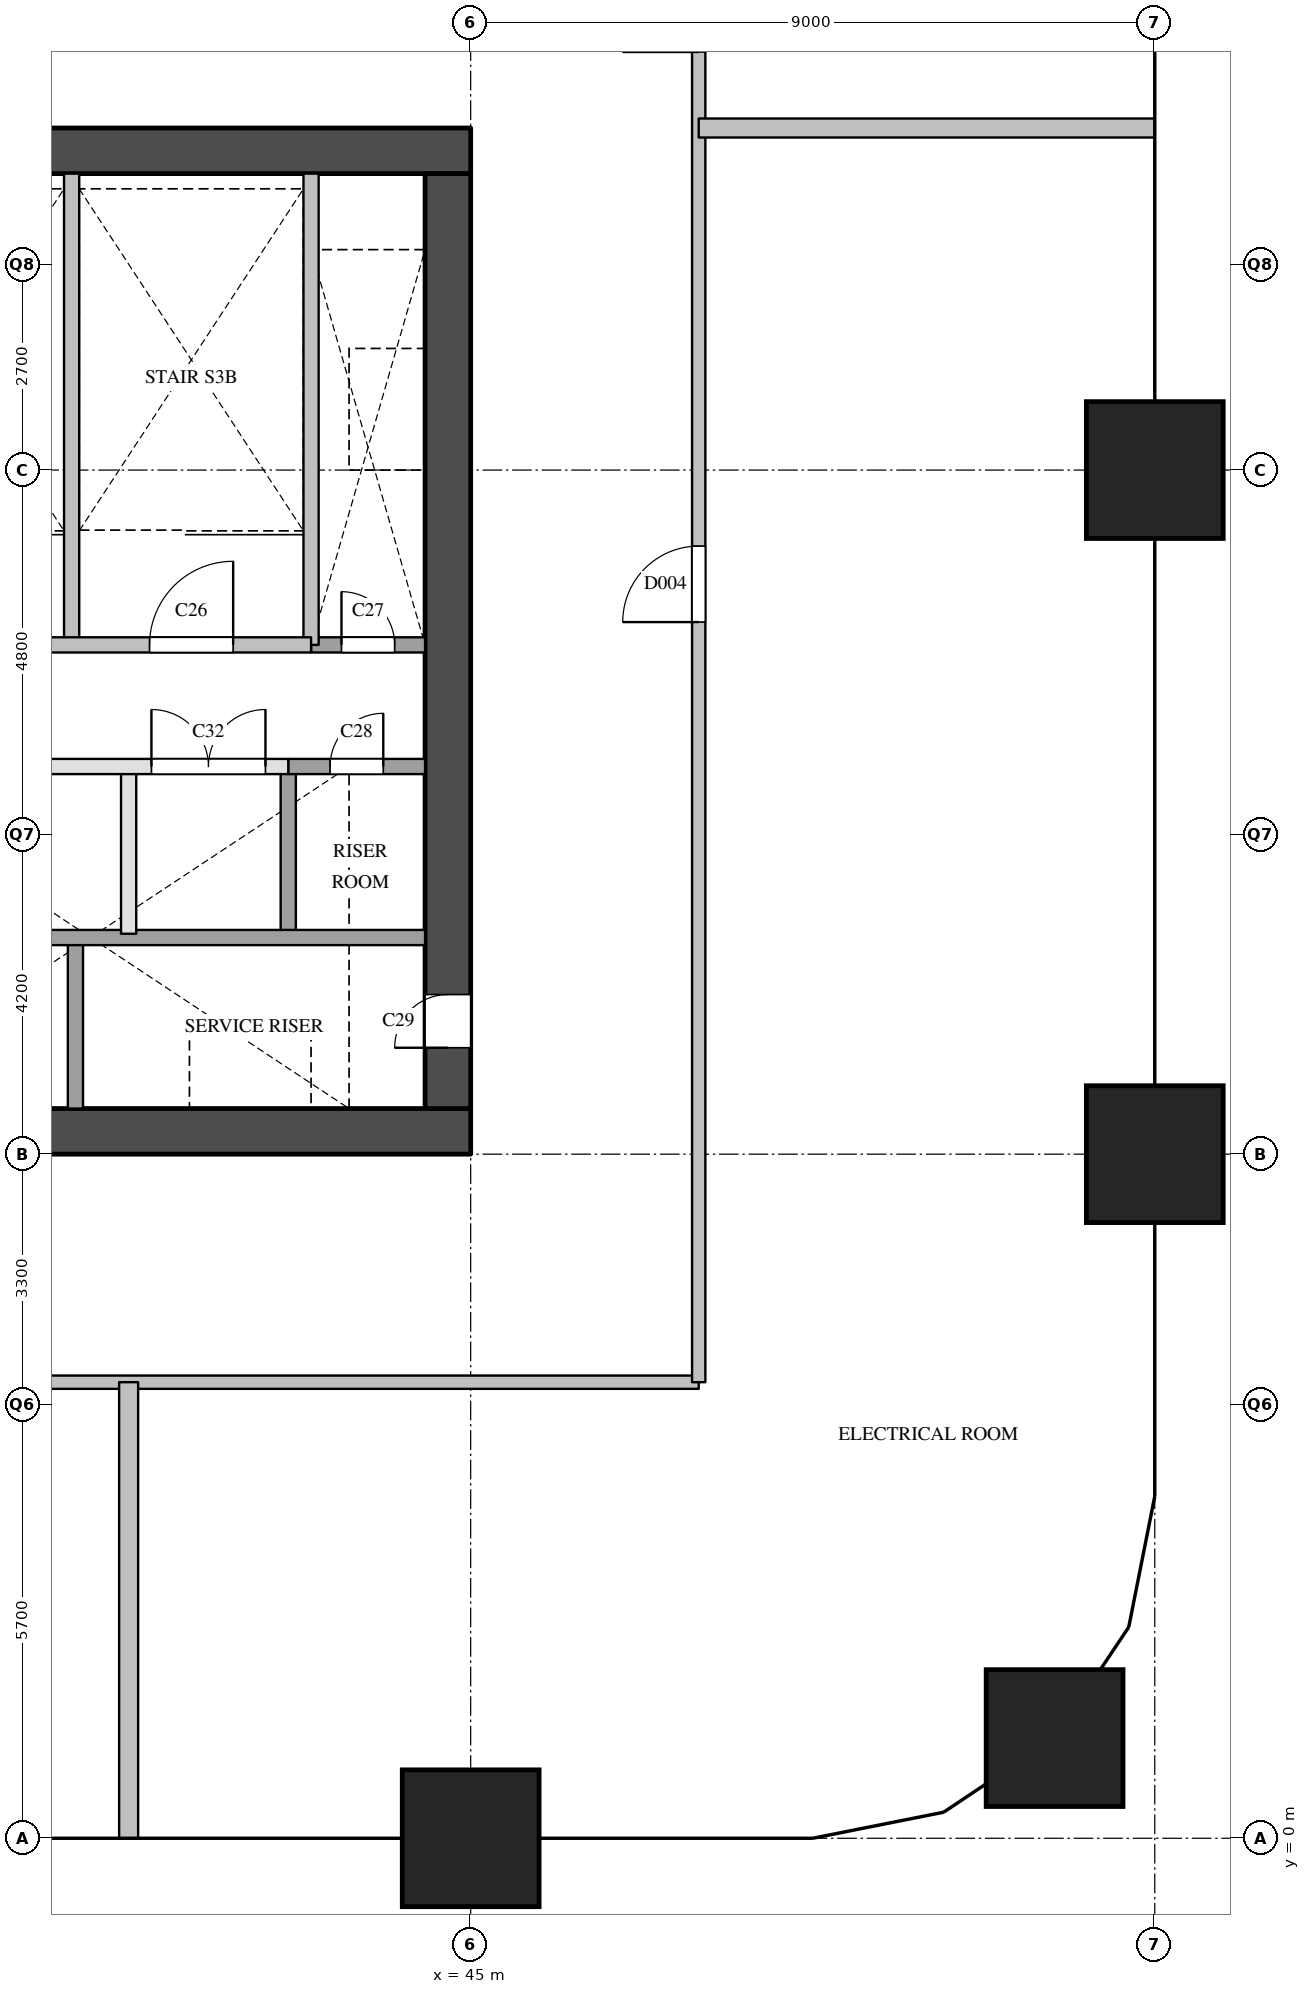
"""IFC4 building model, lengths in metres.
Left out: names, types, materials, properties, quantities, classifications, styles, units other than length and angle.
Written with IfcOpenShell. Run it as: python <this file> out.ifc"""

import sys

from ifc_helpers import new_model, si_unit, direction, frame, frame_2d, origin, origin_2d, place, context, subcontext, project, spatial, rectangle, extrude, element, fill, save


model = new_model("IFC4")
c1 = context("Model", 3, precision=1e-05, world=origin(), true_north=direction((0.0, 1.0)))
c2 = subcontext(c1, "Body", "Model", "MODEL_VIEW")
j1 = project(units=[si_unit("LENGTHUNIT", "METRE"), si_unit("PLANEANGLEUNIT", "RADIAN")], contexts=[c1])
p1 = place(None, origin())
s1 = spatial("IfcSite", under=j1, at=p1, CompositionType="ELEMENT")
p2 = place(p1, origin())
s2 = spatial("IfcBuilding", under=s1, at=p2, CompositionType="ELEMENT")
p3 = place(p2, frame((0.0, 0.0, 123.4)))
s3 = spatial("IfcBuildingStorey", under=s2, at=p3, CompositionType="ELEMENT", Elevation=123.4)
for number, where, z_axis, x_axis in (
    (1, (45.0, 0.0, 0.0), (0.0, 0.0, 1.0), (1.0, 0.0, 0.0)),
    (2, (52.682, 1.318, 0.0), (0.0, 0.0, 1.0), (1.0, 0.0, 0.0)),
    (3, (54.0, 9.0, 0.0), (0.0, 0.0, 1.0), (1.0, 0.0, 0.0)),
    (4, (54.0, 18.0, 0.0), (0.0, 0.0, 1.0), (1.0, 0.0, 0.0)),
):
    element("IfcColumn", number, at=place(p3, frame(where, z_axis=z_axis, x_axis=x_axis)), inside=s3, PredefinedType="COLUMN", context=c2, shape_type="SweptSolid", body=[
        extrude(rectangle(XDim=1.8, YDim=1.8, at=origin_2d()), origin(), (0.0, 0.0, 1.0), 6.0),
    ])
for number, where, z_axis, x_axis in (
    (5, (36.0, 9.3, 0.0), (0.0, 0.0, 1.0), (1.0, 0.0, 0.0)),
    (6, (36.0, 22.2, 0.0), (0.0, 0.0, 1.0), (1.0, 0.0, 0.0)),
):
    element("IfcWall", number, at=place(p3, frame(where, z_axis=z_axis, x_axis=x_axis)), inside=s3, PredefinedType="SHEAR", context=c2, shape_type="SweptSolid", body=[
        extrude(rectangle(XDim=9.0, YDim=0.6, at=frame_2d((4.5, 0.0))), origin(), (0.0, 0.0, 1.0), 5.7),
    ])
p4 = place(p3, frame((44.7, 9.6, 0.0), z_axis=(0.0, 0.0, 1.0), x_axis=(0.0, 1.0, 0.0)))
e7 = element("IfcWall", 7, at=p4, inside=s3, PredefinedType="SHEAR", context=c2, shape_type="SweptSolid", body=[
    extrude(rectangle(XDim=12.3, YDim=0.6, at=frame_2d((6.15, 0.0))), origin(), (0.0, 0.0, 1.0), 5.7),
])
p5 = place(p4, frame((0.8, 0.0, 0.0)))
e8 = element("IfcOpeningElement", 8, at=p5, cuts=e7, PredefinedType="OPENING", context=c2, shape_type="SweptSolid", body=[
    extrude(rectangle(XDim=0.7, YDim=2.1, at=frame_2d((0.35, 1.05))), frame((0.0, 0.31, 0.0), z_axis=(0.0, -1.0, 0.0), x_axis=(1.0, 0.0, 0.0)), (0.0, 0.0, 1.0), 0.62),
])
p6 = place(p3, frame((39.75, 15.7, 0.0), z_axis=(0.0, 0.0, 1.0), x_axis=(0.0, 1.0, 0.0)))
e9 = element("IfcWall", 9, at=p6, inside=s3, PredefinedType="SOLIDWALL", context=c2, shape_type="SweptSolid", body=[
    extrude(rectangle(XDim=6.2, YDim=0.2, at=frame_2d((3.1, 0.0))), origin(), (0.0, 0.0, 1.0), 5.7),
])
p7 = place(p3, frame((39.8, 9.6, 0.0), z_axis=(0.0, 0.0, 1.0), x_axis=(0.0, 1.0, 0.0)))
e10 = element("IfcWall", 10, at=p7, inside=s3, PredefinedType="SOLIDWALL", context=c2, shape_type="SweptSolid", body=[
    extrude(rectangle(XDim=2.3, YDim=0.2, at=frame_2d((1.15, 0.0))), origin(), (0.0, 0.0, 1.0), 5.7),
])
p8 = place(p3, frame((40.5, 11.9, 0.0), z_axis=(0.0, 0.0, 1.0), x_axis=(0.0, 1.0, 0.0)))
e11 = element("IfcWall", 11, at=p8, inside=s3, PredefinedType="PARTITIONING", context=c2, shape_type="SweptSolid", body=[
    extrude(rectangle(XDim=2.2, YDim=0.2, at=frame_2d((1.1, 0.0))), origin(), (0.0, 0.0, 1.0), 5.7),
])
p9 = place(p3, frame((42.6, 11.9, 0.0), z_axis=(0.0, 0.0, 1.0), x_axis=(0.0, 1.0, 0.0)))
e12 = element("IfcWall", 12, at=p9, inside=s3, PredefinedType="SOLIDWALL", context=c2, shape_type="SweptSolid", body=[
    extrude(rectangle(XDim=2.2, YDim=0.2, at=frame_2d((1.1, 0.0))), origin(), (0.0, 0.0, 1.0), 5.7),
])
p10 = place(p3, frame((42.9, 15.7, 0.0), z_axis=(0.0, 0.0, 1.0), x_axis=(0.0, 1.0, 0.0)))
e13 = element("IfcWall", 13, at=p10, inside=s3, PredefinedType="SOLIDWALL", context=c2, shape_type="SweptSolid", body=[
    extrude(rectangle(XDim=6.2, YDim=0.2, at=frame_2d((3.1, 0.0))), origin(), (0.0, 0.0, 1.0), 5.7),
])
p11 = place(p3, frame((36.6, 11.85, 0.0), z_axis=(0.0, 0.0, 1.0), x_axis=(1.0, 0.0, 0.0)))
e14 = element("IfcWall", 14, at=p11, inside=s3, PredefinedType="SOLIDWALL", context=c2, shape_type="SweptSolid", body=[
    extrude(rectangle(XDim=7.8, YDim=0.2, at=frame_2d((3.9, 0.0))), origin(), (0.0, 0.0, 1.0), 5.7),
])
p12 = place(p3, frame((36.6, 14.1, 0.0), z_axis=(0.0, 0.0, 1.0), x_axis=(1.0, 0.0, 0.0)))
e15 = element("IfcWall", 15, at=p12, inside=s3, PredefinedType="PARTITIONING", context=c2, shape_type="SweptSolid", body=[
    extrude(rectangle(XDim=6.0, YDim=0.2, at=frame_2d((3.0, 0.0))), origin(), (0.0, 0.0, 1.0), 5.7),
])
p13 = place(p12, frame((1.2, 0.0, 0.0)))
e16 = element("IfcOpeningElement", 16, at=p13, cuts=e15, PredefinedType="OPENING", context=c2, shape_type="SweptSolid", body=[
    extrude(rectangle(XDim=1.5, YDim=2.1, at=frame_2d((0.75, 1.05))), frame((0.0, 0.11, 0.0), z_axis=(0.0, -1.0, 0.0), x_axis=(1.0, 0.0, 0.0)), (0.0, 0.0, 1.0), 0.22),
])
p14 = place(p12, frame((4.2, 0.0, 0.0)))
e17 = element("IfcOpeningElement", 17, at=p14, cuts=e15, PredefinedType="OPENING", context=c2, shape_type="SweptSolid", body=[
    extrude(rectangle(XDim=1.5, YDim=2.1, at=frame_2d((0.75, 1.05))), frame((0.0, 0.11, 0.0), z_axis=(0.0, -1.0, 0.0), x_axis=(1.0, 0.0, 0.0)), (0.0, 0.0, 1.0), 0.22),
])
p15 = place(p3, frame((42.6, 14.1, 0.0), z_axis=(0.0, 0.0, 1.0), x_axis=(1.0, 0.0, 0.0)))
e18 = element("IfcWall", 18, at=p15, inside=s3, PredefinedType="SOLIDWALL", context=c2, shape_type="SweptSolid", body=[
    extrude(rectangle(XDim=1.8, YDim=0.2, at=frame_2d((0.9, 0.0))), origin(), (0.0, 0.0, 1.0), 5.7),
])
p16 = place(p15, frame((0.55, 0.0, 0.0)))
e19 = element("IfcOpeningElement", 19, at=p16, cuts=e18, PredefinedType="OPENING", context=c2, shape_type="SweptSolid", body=[
    extrude(rectangle(XDim=0.7, YDim=2.1, at=frame_2d((0.35, 1.05))), frame((0.0, 0.11, 0.0), z_axis=(0.0, -1.0, 0.0), x_axis=(1.0, 0.0, 0.0)), (0.0, 0.0, 1.0), 0.22),
])
p17 = place(p3, frame((42.9, 15.7, 0.0), z_axis=(0.0, 0.0, 1.0), x_axis=(1.0, 0.0, 0.0)))
e20 = element("IfcWall", 20, at=p17, inside=s3, PredefinedType="SOLIDWALL", context=c2, shape_type="SweptSolid", body=[
    extrude(rectangle(XDim=1.5, YDim=0.2, at=frame_2d((0.75, 0.0))), origin(), (0.0, 0.0, 1.0), 5.7),
])
p18 = place(p17, frame((0.4, 0.0, 0.0)))
e21 = element("IfcOpeningElement", 21, at=p18, cuts=e20, PredefinedType="OPENING", context=c2, shape_type="SweptSolid", body=[
    extrude(rectangle(XDim=0.7, YDim=2.1, at=frame_2d((0.35, 1.05))), frame((0.0, 0.11, 0.0), z_axis=(0.0, -1.0, 0.0), x_axis=(1.0, 0.0, 0.0)), (0.0, 0.0, 1.0), 0.22),
])
p19 = place(p3, frame((36.6, 15.7, 0.0), z_axis=(0.0, 0.0, 1.0), x_axis=(1.0, 0.0, 0.0)))
e22 = element("IfcWall", 22, at=p19, inside=s3, PredefinedType="SOLIDWALL", context=c2, shape_type="SweptSolid", body=[
    extrude(rectangle(XDim=6.3, YDim=0.2, at=frame_2d((3.15, 0.0))), origin(), (0.0, 0.0, 1.0), 5.7),
])
p20 = place(p19, frame((1.025, 0.0, 0.0)))
e23 = element("IfcOpeningElement", 23, at=p20, cuts=e22, PredefinedType="OPENING", context=c2, shape_type="SweptSolid", body=[
    extrude(rectangle(XDim=1.1, YDim=2.1, at=frame_2d((0.55, 1.05))), frame((0.0, 0.11, 0.0), z_axis=(0.0, -1.0, 0.0), x_axis=(1.0, 0.0, 0.0)), (0.0, 0.0, 1.0), 0.22),
])
p21 = place(p19, frame((4.175, 0.0, 0.0)))
e24 = element("IfcOpeningElement", 24, at=p21, cuts=e22, PredefinedType="OPENING", context=c2, shape_type="SweptSolid", body=[
    extrude(rectangle(XDim=1.1, YDim=2.1, at=frame_2d((0.55, 1.05))), frame((0.0, 0.11, 0.0), z_axis=(0.0, -1.0, 0.0), x_axis=(1.0, 0.0, 0.0)), (0.0, 0.0, 1.0), 0.22),
])
p22 = place(p3, frame((33.0, 6.0, 0.0), z_axis=(0.0, 0.0, 1.0), x_axis=(1.0, 0.0, 0.0)))
e25 = element("IfcWall", 25, at=p22, inside=s3, PredefinedType="PARTITIONING", context=c2, shape_type="SweptSolid", body=[
    extrude(rectangle(XDim=15.0, YDim=0.175, at=frame_2d((7.5, 0.0))), origin(), (0.0, 0.0, 1.0), 5.7),
])
p23 = place(p3, frame((48.0, 6.0, 0.0), z_axis=(0.0, 0.0, 1.0), x_axis=(0.0, 1.0, 0.0)))
e26 = element("IfcWall", 26, at=p23, inside=s3, PredefinedType="PARTITIONING", context=c2, shape_type="SweptSolid", body=[
    extrude(rectangle(XDim=22.5, YDim=0.175, at=frame_2d((11.25, 0.0))), origin(), (0.0, 0.0, 1.0), 5.7),
])
p24 = place(p23, frame((10.0, 0.0, 0.0)))
e27 = element("IfcOpeningElement", 27, at=p24, cuts=e26, PredefinedType="OPENING", context=c2, shape_type="SweptSolid", body=[
    extrude(rectangle(XDim=1.0, YDim=2.1, at=frame_2d((0.5, 1.05))), frame((0.0, 0.097, 0.0), z_axis=(0.0, -1.0, 0.0), x_axis=(1.0, 0.0, 0.0)), (0.0, 0.0, 1.0), 0.195),
])
p25 = place(p23, frame((17.5, 0.0, 0.0)))
e28 = element("IfcOpeningElement", 28, at=p25, cuts=e26, PredefinedType="OPENING", context=c2, shape_type="SweptSolid", body=[
    extrude(rectangle(XDim=1.0, YDim=2.1, at=frame_2d((0.5, 1.05))), frame((0.0, 0.097, 0.0), z_axis=(0.0, -1.0, 0.0), x_axis=(1.0, 0.0, 0.0)), (0.0, 0.0, 1.0), 0.195),
])
for number, where, z_axis, x_axis in (
    (29, (48.0, 22.5, 0.0), (0.0, 0.0, 1.0), (1.0, 0.0, 0.0)),
    (30, (40.5, 0.0, 0.0), (0.0, 0.0, 1.0), (0.0, 1.0, 0.0)),
):
    element("IfcWall", number, at=place(p3, frame(where, z_axis=z_axis, x_axis=x_axis)), inside=s3, PredefinedType="PARTITIONING", context=c2, shape_type="SweptSolid", body=[
        extrude(rectangle(XDim=6.0, YDim=0.25, at=frame_2d((3.0, 0.0))), origin(), (0.0, 0.0, 1.0), 5.7),
    ])
p26 = place(p21, origin())
e31 = element("IfcDoor", 31, at=p26, inside=s3, OperationType="SINGLE_SWING_RIGHT", PredefinedType="DOOR", context=c2, shape_type="SweptSolid", body=[
    extrude(rectangle(XDim=1.1, YDim=2.1, at=frame_2d((0.55, 1.05))), frame((0.0, 0.025, 0.0), z_axis=(0.0, -1.0, 0.0), x_axis=(1.0, 0.0, 0.0)), (0.0, 0.0, 1.0), 0.05),
])
fill(e24, e31)
p27 = place(p18, origin())
e32 = element("IfcDoor", 32, at=p27, inside=s3, OperationType="SINGLE_SWING_LEFT", PredefinedType="DOOR", context=c2, shape_type="SweptSolid", body=[
    extrude(rectangle(XDim=0.7, YDim=2.1, at=frame_2d((0.35, 1.05))), frame((0.0, 0.025, 0.0), z_axis=(0.0, -1.0, 0.0), x_axis=(1.0, 0.0, 0.0)), (0.0, 0.0, 1.0), 0.05),
])
fill(e21, e32)
p28 = place(p16, origin())
e33 = element("IfcDoor", 33, at=p28, inside=s3, OperationType="SINGLE_SWING_RIGHT", PredefinedType="DOOR", context=c2, shape_type="SweptSolid", body=[
    extrude(rectangle(XDim=0.7, YDim=2.1, at=frame_2d((0.35, 1.05))), frame((0.0, 0.025, 0.0), z_axis=(0.0, -1.0, 0.0), x_axis=(1.0, 0.0, 0.0)), (0.0, 0.0, 1.0), 0.05),
])
fill(e19, e33)
p29 = place(p5, origin())
e34 = element("IfcDoor", 34, at=p29, inside=s3, OperationType="SINGLE_SWING_LEFT", PredefinedType="DOOR", context=c2, shape_type="SweptSolid", body=[
    extrude(rectangle(XDim=0.7, YDim=2.1, at=frame_2d((0.35, 1.05))), frame((0.0, 0.025, 0.0), z_axis=(0.0, -1.0, 0.0), x_axis=(1.0, 0.0, 0.0)), (0.0, 0.0, 1.0), 0.05),
])
fill(e8, e34)
p30 = place(p14, origin())
e35 = element("IfcDoor", 35, at=p30, inside=s3, OperationType="DOUBLE_DOOR_SINGLE_SWING", PredefinedType="DOOR", context=c2, shape_type="SweptSolid", body=[
    extrude(rectangle(XDim=1.5, YDim=2.1, at=frame_2d((0.75, 1.05))), frame((0.0, 0.025, 0.0), z_axis=(0.0, -1.0, 0.0), x_axis=(1.0, 0.0, 0.0)), (0.0, 0.0, 1.0), 0.05),
])
fill(e17, e35)
p31 = place(p24, origin())
e36 = element("IfcDoor", 36, at=p31, inside=s3, OperationType="SINGLE_SWING_LEFT", PredefinedType="DOOR", context=c2, shape_type="SweptSolid", body=[
    extrude(rectangle(XDim=1.0, YDim=2.1, at=frame_2d((0.5, 1.05))), frame((0.0, 0.025, 0.0), z_axis=(0.0, -1.0, 0.0), x_axis=(1.0, 0.0, 0.0)), (0.0, 0.0, 1.0), 0.05),
])
fill(e27, e36)
save(model, sys.argv[1])
